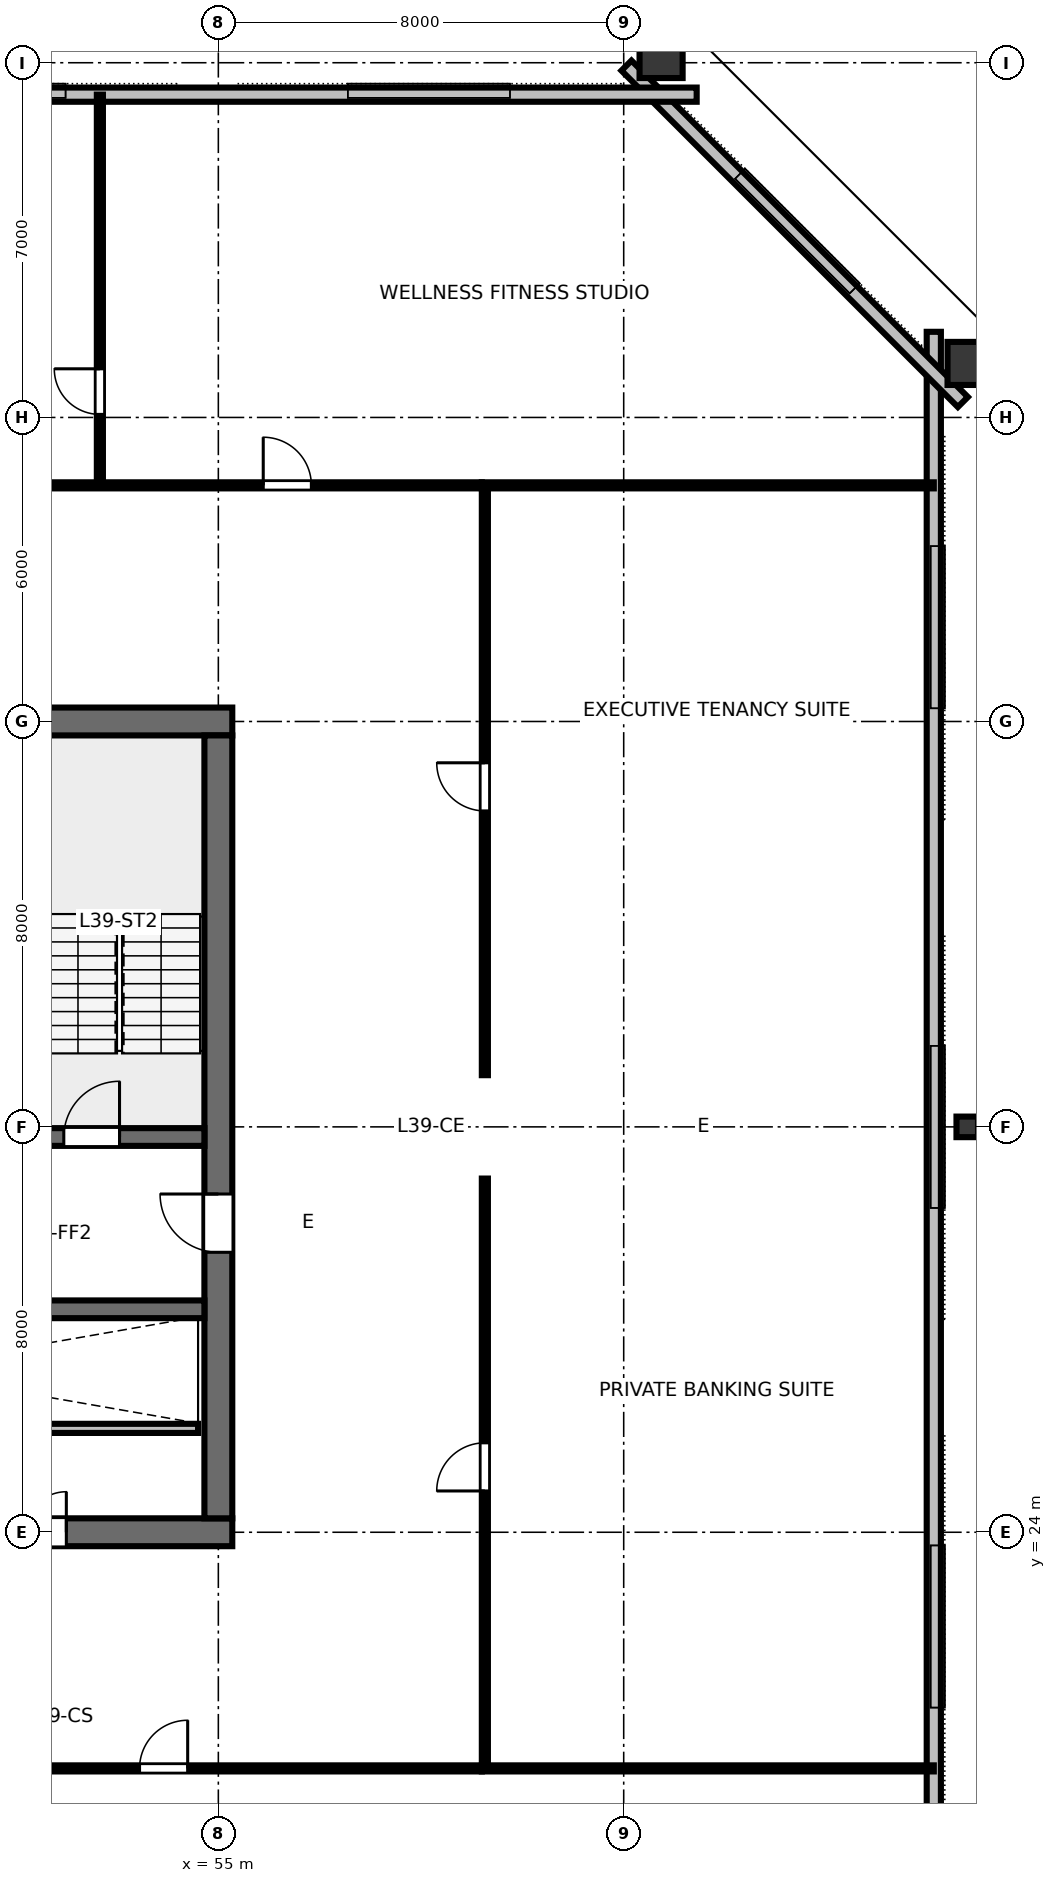
"""IFC4 building model, lengths in metres.
Left out: names, types, materials, properties, quantities, classifications, styles, units other than length and angle.
Written with IfcOpenShell. Run it as: python <this file> out.ifc"""

import sys

from ifc_helpers import new_model, si_unit, direction, frame, frame_2d, origin, origin_2d, place, context, subcontext, project, spatial, rectangle, hollow_rectangle, i_section, extrude, element, fill, save


model = new_model("IFC4")
c1 = context("Model", 3, precision=1e-05, world=origin(), true_north=direction((0.0, 1.0)))
c2 = subcontext(c1, "Body", "Model", "MODEL_VIEW")
j1 = project(units=[si_unit("LENGTHUNIT", "METRE"), si_unit("PLANEANGLEUNIT", "RADIAN")], contexts=[c1])
p1 = place(None, origin())
s1 = spatial("IfcSite", under=j1, at=p1, CompositionType="ELEMENT")
p2 = place(p1, origin())
s2 = spatial("IfcBuilding", under=s1, at=p2, CompositionType="ELEMENT")
p3 = place(p2, frame((0.0, 0.0, 149.2)))
s3 = spatial("IfcBuildingStorey", under=s2, at=p3, CompositionType="ELEMENT", Elevation=149.2)
p4 = place(p3, frame((36.725, 24.0, 0.0), z_axis=(0.0, 0.0, 1.0), x_axis=(1.0, 0.0, 0.0)))
e1 = element("IfcWall", 1, at=p4, inside=s3, PredefinedType="SHEAR", context=c2, shape_type="SweptSolid", body=[
    extrude(rectangle(XDim=18.55, YDim=0.55, at=frame_2d((9.275, 0.0))), origin(), (0.0, 0.0, 1.0), 3.36),
])
p5 = place(p4, frame((8.275, 0.0, 0.0)))
e2 = element("IfcOpeningElement", 2, at=p5, cuts=e1, PredefinedType="OPENING", context=c2, shape_type="SweptSolid", body=[
    extrude(rectangle(XDim=1.6, YDim=2.15, at=frame_2d((0.8, 1.075))), frame((0.0, 0.285, 0.0), z_axis=(0.0, -1.0, 0.0), x_axis=(1.0, 0.0, 0.0)), (0.0, 0.0, 1.0), 0.57),
])
p6 = place(p4, frame((13.675, 0.0, 0.0)))
e3 = element("IfcOpeningElement", 3, at=p6, cuts=e1, PredefinedType="OPENING", context=c2, shape_type="SweptSolid", body=[
    extrude(rectangle(XDim=1.6, YDim=2.15, at=frame_2d((0.8, 1.075))), frame((0.0, 0.285, 0.0), z_axis=(0.0, -1.0, 0.0), x_axis=(1.0, 0.0, 0.0)), (0.0, 0.0, 1.0), 0.57),
])
p7 = place(p3, frame((36.725, 40.0, 0.0), z_axis=(0.0, 0.0, 1.0), x_axis=(1.0, 0.0, 0.0)))
e4 = element("IfcWall", 4, at=p7, inside=s3, PredefinedType="SHEAR", context=c2, shape_type="SweptSolid", body=[
    extrude(rectangle(XDim=18.55, YDim=0.55, at=frame_2d((9.275, 0.0))), origin(), (0.0, 0.0, 1.0), 3.36),
])
p8 = place(p7, frame((8.775, 0.0, 0.0)))
e5 = element("IfcOpeningElement", 5, at=p8, cuts=e4, PredefinedType="OPENING", context=c2, shape_type="SweptSolid", body=[
    extrude(rectangle(XDim=1.0, YDim=2.15, at=frame_2d((0.5, 1.075))), frame((0.0, 0.285, 0.0), z_axis=(0.0, -1.0, 0.0), x_axis=(1.0, 0.0, 0.0)), (0.0, 0.0, 1.0), 0.57),
])
p9 = place(p3, frame((55.0, 24.275, 0.0), z_axis=(0.0, 0.0, 1.0), x_axis=(0.0, 1.0, 0.0)))
e6 = element("IfcWall", 6, at=p9, inside=s3, PredefinedType="SHEAR", context=c2, shape_type="SweptSolid", body=[
    extrude(rectangle(XDim=15.45, YDim=0.55, at=frame_2d((7.725, 0.0))), origin(), (0.0, 0.0, 1.0), 3.36),
])
p10 = place(p9, frame((5.25, 0.0, 0.0)))
e7 = element("IfcOpeningElement", 7, at=p10, cuts=e6, PredefinedType="OPENING", context=c2, shape_type="SweptSolid", body=[
    extrude(rectangle(XDim=1.15, YDim=2.15, at=frame_2d((0.575, 1.075))), frame((0.0, 0.285, 0.0), z_axis=(0.0, -1.0, 0.0), x_axis=(1.0, 0.0, 0.0)), (0.0, 0.0, 1.0), 0.57),
])
p11 = place(p3, frame((37.275, 31.8, 0.0), z_axis=(0.0, 0.0, 1.0), x_axis=(1.0, 0.0, 0.0)))
e8 = element("IfcWall", 8, at=p11, inside=s3, PredefinedType="SHEAR", context=c2, shape_type="SweptSolid", body=[
    extrude(rectangle(XDim=17.45, YDim=0.35, at=frame_2d((8.725, 0.0))), origin(), (0.0, 0.0, 1.0), 3.36),
])
p12 = place(p11, frame((0.775, 0.0, 0.0)))
e9 = element("IfcOpeningElement", 9, at=p12, cuts=e8, PredefinedType="OPENING", context=c2, shape_type="SweptSolid", body=[
    extrude(rectangle(XDim=1.1, YDim=2.15, at=frame_2d((0.55, 1.075))), frame((0.0, 0.185, 0.0), z_axis=(0.0, -1.0, 0.0), x_axis=(1.0, 0.0, 0.0)), (0.0, 0.0, 1.0), 0.37),
])
p13 = place(p11, frame((14.675, 0.0, 0.0)))
e10 = element("IfcOpeningElement", 10, at=p13, cuts=e8, PredefinedType="OPENING", context=c2, shape_type="SweptSolid", body=[
    extrude(rectangle(XDim=1.1, YDim=2.15, at=frame_2d((0.55, 1.075))), frame((0.0, 0.185, 0.0), z_axis=(0.0, -1.0, 0.0), x_axis=(1.0, 0.0, 0.0)), (0.0, 0.0, 1.0), 0.37),
])
p14 = place(p3, frame((37.275, 28.4, 0.0), z_axis=(0.0, 0.0, 1.0), x_axis=(1.0, 0.0, 0.0)))
e11 = element("IfcWall", 11, at=p14, inside=s3, PredefinedType="SHEAR", context=c2, shape_type="SweptSolid", body=[
    extrude(rectangle(XDim=17.45, YDim=0.35, at=frame_2d((8.725, 0.0))), origin(), (0.0, 0.0, 1.0), 3.36),
])
p15 = place(p3, frame((69.78, 32.0, 0.0), z_axis=(0.0, 0.0, 1.0), x_axis=(0.0, 1.0, 0.0)))
e12 = element("IfcColumn", 12, at=p15, inside=s3, PredefinedType="COLUMN", context=c2, shape_type="SweptSolid", body=[
    extrude(i_section(OverallWidth=0.406, OverallDepth=0.425, WebThickness=0.033, FlangeThickness=0.052, FilletRadius=0.025, at=origin_2d()), origin(), (0.0, 0.0, 1.0), 3.358),
])
for number, where, z_axis, x_axis in (
    (13, (69.891, 47.066, 0.0), (0.0, 0.0, 1.0), (0.0, 1.0, 0.0)),
    (14, (63.738, 53.198, 0.0), (0.0, 0.0, 1.0), (1.0, 0.0, 0.0)),
):
    element("IfcColumn", number, at=place(p3, frame(where, z_axis=z_axis, x_axis=x_axis)), inside=s3, PredefinedType="COLUMN", context=c2, shape_type="SweptSolid", body=[
        extrude(hollow_rectangle(XDim=0.85, YDim=1.0, WallThickness=0.05, at=origin_2d()), origin(), (0.0, 0.0, 1.0), 3.358),
    ])
p16 = place(p3, frame((69.12, 16.31, 0.0), z_axis=(0.0, 0.0, 1.0), x_axis=(0.0, 1.0, 0.0)))
e15 = element("IfcWall", 15, at=p16, inside=s3, PredefinedType="STANDARD", context=c2, shape_type="SweptSolid", body=[
    extrude(rectangle(XDim=31.38, YDim=0.28, at=frame_2d((15.69, 0.0))), origin(), (0.0, 0.0, 1.0), 3.36),
])
p17 = place(p3, frame((69.694, 46.304, 0.0), z_axis=(0.0, 0.0, 1.0), x_axis=(-0.707106781187, 0.707106781187, 0.0)))
e16 = element("IfcWall", 16, at=p17, inside=s3, PredefinedType="STANDARD", context=c2, shape_type="SweptSolid", body=[
    extrude(rectangle(XDim=9.39, YDim=0.28, at=frame_2d((4.695, 0.0))), origin(), (0.0, 0.0, 1.0), 3.36),
])
p18 = place(p3, frame((64.44, 52.37, 0.0), z_axis=(0.0, 0.0, 1.0), x_axis=(-1.0, 0.0, 0.0)))
e17 = element("IfcWall", 17, at=p18, inside=s3, PredefinedType="STANDARD", context=c2, shape_type="SweptSolid", body=[
    extrude(rectangle(XDim=36.88, YDim=0.28, at=frame_2d((18.44, 0.0))), origin(), (0.0, 0.0, 1.0), 3.36),
])
p19 = place(p3, frame((42.55, 26.05, 0.0), z_axis=(0.0, 0.0, 1.0), x_axis=(1.0, 0.0, 0.0)))
e18 = element("IfcWall", 18, at=p19, inside=s3, PredefinedType="PARTITIONING", context=c2, shape_type="SweptSolid", body=[
    extrude(rectangle(XDim=12.05, YDim=0.18, at=frame_2d((6.025, 0.0))), origin(), (0.0, 0.0, 1.0), 3.36),
])
p20 = place(p19, frame((1.1, 0.0, 0.0)))
e19 = element("IfcOpeningElement", 19, at=p20, cuts=e18, PredefinedType="OPENING", context=c2, shape_type="SweptSolid", body=[
    extrude(rectangle(XDim=1.05, YDim=2.15, at=frame_2d((0.525, 1.075))), frame((0.0, 0.1, 0.0), z_axis=(0.0, -1.0, 0.0), x_axis=(1.0, 0.0, 0.0)), (0.0, 0.0, 1.0), 0.2),
])
p21 = place(p19, frame((3.0, 0.0, 0.0)))
e20 = element("IfcOpeningElement", 20, at=p21, cuts=e18, PredefinedType="OPENING", context=c2, shape_type="SweptSolid", body=[
    extrude(rectangle(XDim=1.05, YDim=2.15, at=frame_2d((0.525, 1.075))), frame((0.0, 0.1, 0.0), z_axis=(0.0, -1.0, 0.0), x_axis=(1.0, 0.0, 0.0)), (0.0, 0.0, 1.0), 0.2),
])
p22 = place(p3, frame((31.8, 19.34, 0.0), z_axis=(0.0, 0.0, 1.0), x_axis=(1.0, 0.0, 0.0)))
e21 = element("IfcWall", 21, at=p22, inside=s3, PredefinedType="PARTITIONING", context=c2, shape_type="SweptSolid", body=[
    extrude(rectangle(XDim=28.4, YDim=0.12, at=frame_2d((14.2, 0.0))), origin(), (0.0, 0.0, 1.0), 2.64),
])
p23 = place(p22, frame((4.789, 0.0, 0.0)))
e22 = element("IfcOpeningElement", 22, at=p23, cuts=e21, PredefinedType="OPENING", context=c2, shape_type="SweptSolid", body=[
    extrude(rectangle(XDim=0.95, YDim=2.15, at=frame_2d((0.475, 1.075))), frame((0.0, 0.07, 0.0), z_axis=(0.0, -1.0, 0.0), x_axis=(1.0, 0.0, 0.0)), (0.0, 0.0, 1.0), 0.14),
])
p24 = place(p22, frame((12.708, 0.0, 0.0)))
e23 = element("IfcOpeningElement", 23, at=p24, cuts=e21, PredefinedType="OPENING", context=c2, shape_type="SweptSolid", body=[
    extrude(rectangle(XDim=0.95, YDim=2.15, at=frame_2d((0.475, 1.075))), frame((0.0, 0.07, 0.0), z_axis=(0.0, -1.0, 0.0), x_axis=(1.0, 0.0, 0.0)), (0.0, 0.0, 1.0), 0.14),
])
p25 = place(p22, frame((21.645, 0.0, 0.0)))
e24 = element("IfcOpeningElement", 24, at=p25, cuts=e21, PredefinedType="OPENING", context=c2, shape_type="SweptSolid", body=[
    extrude(rectangle(XDim=0.95, YDim=2.15, at=frame_2d((0.475, 1.075))), frame((0.0, 0.07, 0.0), z_axis=(0.0, -1.0, 0.0), x_axis=(1.0, 0.0, 0.0)), (0.0, 0.0, 1.0), 0.14),
])
p26 = place(p3, frame((52.662, 44.66, 0.0), z_axis=(0.0, 0.0, 1.0), x_axis=(0.0, 1.0, 0.0)))
e25 = element("IfcWall", 25, at=p26, inside=s3, PredefinedType="PARTITIONING", context=c2, shape_type="SweptSolid", body=[
    extrude(rectangle(XDim=7.71, YDim=0.12, at=frame_2d((3.855, 0.0))), origin(), (0.0, 0.0, 1.0), 2.64),
])
p27 = place(p26, frame((1.4, 0.0, 0.0)))
e26 = element("IfcOpeningElement", 26, at=p27, cuts=e25, PredefinedType="OPENING", context=c2, shape_type="SweptSolid", body=[
    extrude(rectangle(XDim=0.9, YDim=2.15, at=frame_2d((0.45, 1.075))), frame((0.0, 0.07, 0.0), z_axis=(0.0, -1.0, 0.0), x_axis=(1.0, 0.0, 0.0)), (0.0, 0.0, 1.0), 0.14),
])
p28 = place(p3, frame((31.8, 44.66, 0.0), z_axis=(0.0, 0.0, 1.0), x_axis=(1.0, 0.0, 0.0)))
e27 = element("IfcWall", 27, at=p28, inside=s3, PredefinedType="PARTITIONING", context=c2, shape_type="SweptSolid", body=[
    extrude(rectangle(XDim=28.4, YDim=0.12, at=frame_2d((14.2, 0.0))), origin(), (0.0, 0.0, 1.0), 2.64),
])
p29 = place(p28, frame((4.036, 0.0, 0.0)))
e28 = element("IfcOpeningElement", 28, at=p29, cuts=e27, PredefinedType="OPENING", context=c2, shape_type="SweptSolid", body=[
    extrude(rectangle(XDim=0.95, YDim=2.15, at=frame_2d((0.475, 1.075))), frame((0.0, 0.07, 0.0), z_axis=(0.0, -1.0, 0.0), x_axis=(1.0, 0.0, 0.0)), (0.0, 0.0, 1.0), 0.14),
])
p30 = place(p28, frame((12.256, 0.0, 0.0)))
e29 = element("IfcOpeningElement", 29, at=p30, cuts=e27, PredefinedType="OPENING", context=c2, shape_type="SweptSolid", body=[
    extrude(rectangle(XDim=0.95, YDim=2.15, at=frame_2d((0.475, 1.075))), frame((0.0, 0.07, 0.0), z_axis=(0.0, -1.0, 0.0), x_axis=(1.0, 0.0, 0.0)), (0.0, 0.0, 1.0), 0.14),
])
p31 = place(p28, frame((18.246, 0.0, 0.0)))
e30 = element("IfcOpeningElement", 30, at=p31, cuts=e27, PredefinedType="OPENING", context=c2, shape_type="SweptSolid", body=[
    extrude(rectangle(XDim=0.95, YDim=2.15, at=frame_2d((0.475, 1.075))), frame((0.0, 0.07, 0.0), z_axis=(0.0, -1.0, 0.0), x_axis=(1.0, 0.0, 0.0)), (0.0, 0.0, 1.0), 0.14),
])
p32 = place(p28, frame((24.086, 0.0, 0.0)))
e31 = element("IfcOpeningElement", 31, at=p32, cuts=e27, PredefinedType="OPENING", context=c2, shape_type="SweptSolid", body=[
    extrude(rectangle(XDim=0.95, YDim=2.15, at=frame_2d((0.475, 1.075))), frame((0.0, 0.07, 0.0), z_axis=(0.0, -1.0, 0.0), x_axis=(1.0, 0.0, 0.0)), (0.0, 0.0, 1.0), 0.14),
])
p33 = place(p3, frame((60.26, 19.4, 0.0), z_axis=(0.0, 0.0, 1.0), x_axis=(0.0, 1.0, 0.0)))
e32 = element("IfcWall", 32, at=p33, inside=s3, PredefinedType="PARTITIONING", context=c2, shape_type="SweptSolid", body=[
    extrude(rectangle(XDim=11.58, YDim=0.12, at=frame_2d((5.79, 0.0))), origin(), (0.0, 0.0, 1.0), 2.64),
])
p34 = place(p33, frame((5.415, 0.0, 0.0)))
e33 = element("IfcOpeningElement", 33, at=p34, cuts=e32, PredefinedType="OPENING", context=c2, shape_type="SweptSolid", body=[
    extrude(rectangle(XDim=0.95, YDim=2.15, at=frame_2d((0.475, 1.075))), frame((0.0, 0.07, 0.0), z_axis=(0.0, -1.0, 0.0), x_axis=(1.0, 0.0, 0.0)), (0.0, 0.0, 1.0), 0.14),
])
p35 = place(p3, frame((60.26, 33.02, 0.0), z_axis=(0.0, 0.0, 1.0), x_axis=(0.0, 1.0, 0.0)))
e34 = element("IfcWall", 34, at=p35, inside=s3, PredefinedType="PARTITIONING", context=c2, shape_type="SweptSolid", body=[
    extrude(rectangle(XDim=11.58, YDim=0.12, at=frame_2d((5.79, 0.0))), origin(), (0.0, 0.0, 1.0), 2.64),
])
p36 = place(p35, frame((5.215, 0.0, 0.0)))
e35 = element("IfcOpeningElement", 35, at=p36, cuts=e34, PredefinedType="OPENING", context=c2, shape_type="SweptSolid", body=[
    extrude(rectangle(XDim=0.95, YDim=2.15, at=frame_2d((0.475, 1.075))), frame((0.0, 0.07, 0.0), z_axis=(0.0, -1.0, 0.0), x_axis=(1.0, 0.0, 0.0)), (0.0, 0.0, 1.0), 0.14),
])
for number, where, z_axis, x_axis in (
    (36, (60.2, 19.34, 0.0), (0.0, 0.0, 1.0), (1.0, 0.0, 0.0)),
    (37, (60.2, 44.66, 0.0), (0.0, 0.0, 1.0), (1.0, 0.0, 0.0)),
):
    element("IfcWall", number, at=place(p3, frame(where, z_axis=z_axis, x_axis=x_axis)), inside=s3, PredefinedType="PARTITIONING", context=c2, shape_type="SweptSolid", body=[
        extrude(rectangle(XDim=8.92, YDim=0.12, at=frame_2d((4.46, 0.0))), origin(), (0.0, 0.0, 1.0), 2.64),
    ])
p37 = place(p13, origin())
e38 = element("IfcDoor", 38, at=p37, inside=s3, OperationType="SINGLE_SWING_RIGHT", PredefinedType="DOOR", context=c2, shape_type="SweptSolid", body=[
    extrude(rectangle(XDim=1.1, YDim=2.15, at=frame_2d((0.55, 1.075))), frame((0.0, 0.025, 0.0), z_axis=(0.0, -1.0, 0.0), x_axis=(1.0, 0.0, 0.0)), (0.0, 0.0, 1.0), 0.05),
])
fill(e10, e38)
p38 = place(p10, origin())
e39 = element("IfcDoor", 39, at=p38, inside=s3, OperationType="SINGLE_SWING_RIGHT", PredefinedType="DOOR", context=c2, shape_type="SweptSolid", body=[
    extrude(rectangle(XDim=1.15, YDim=2.15, at=frame_2d((0.575, 1.075))), frame((0.0, 0.025, 0.0), z_axis=(0.0, -1.0, 0.0), x_axis=(1.0, 0.0, 0.0)), (0.0, 0.0, 1.0), 0.05),
])
fill(e7, e39)
p39 = place(p6, origin())
e40 = element("IfcDoor", 40, at=p39, inside=s3, OperationType="DOUBLE_DOOR_SINGLE_SWING", PredefinedType="DOOR", context=c2, shape_type="SweptSolid", body=[
    extrude(rectangle(XDim=1.6, YDim=2.15, at=frame_2d((0.8, 1.075))), frame((0.0, 0.025, 0.0), z_axis=(0.0, -1.0, 0.0), x_axis=(1.0, 0.0, 0.0)), (0.0, 0.0, 1.0), 0.05),
])
fill(e3, e40)
p40 = place(p25, origin())
e41 = element("IfcDoor", 41, at=p40, inside=s3, OperationType="SINGLE_SWING_RIGHT", PredefinedType="DOOR", context=c2, shape_type="SweptSolid", body=[
    extrude(rectangle(XDim=0.95, YDim=2.15, at=frame_2d((0.475, 1.075))), frame((0.0, 0.025, 0.0), z_axis=(0.0, -1.0, 0.0), x_axis=(1.0, 0.0, 0.0)), (0.0, 0.0, 1.0), 0.05),
])
fill(e24, e41)
p41 = place(p27, origin())
e42 = element("IfcDoor", 42, at=p41, inside=s3, OperationType="SINGLE_SWING_RIGHT", PredefinedType="DOOR", context=c2, shape_type="SweptSolid", body=[
    extrude(rectangle(XDim=0.9, YDim=2.15, at=frame_2d((0.45, 1.075))), frame((0.0, 0.025, 0.0), z_axis=(0.0, -1.0, 0.0), x_axis=(1.0, 0.0, 0.0)), (0.0, 0.0, 1.0), 0.05),
])
fill(e26, e42)
p42 = place(p32, origin())
e43 = element("IfcDoor", 43, at=p42, inside=s3, OperationType="SINGLE_SWING_LEFT", PredefinedType="DOOR", context=c2, shape_type="SweptSolid", body=[
    extrude(rectangle(XDim=0.95, YDim=2.15, at=frame_2d((0.475, 1.075))), frame((0.0, 0.025, 0.0), z_axis=(0.0, -1.0, 0.0), x_axis=(1.0, 0.0, 0.0)), (0.0, 0.0, 1.0), 0.05),
])
fill(e31, e43)
p43 = place(p34, origin())
e44 = element("IfcDoor", 44, at=p43, inside=s3, OperationType="SINGLE_SWING_LEFT", PredefinedType="DOOR", context=c2, shape_type="SweptSolid", body=[
    extrude(rectangle(XDim=0.95, YDim=2.15, at=frame_2d((0.475, 1.075))), frame((0.0, 0.025, 0.0), z_axis=(0.0, -1.0, 0.0), x_axis=(1.0, 0.0, 0.0)), (0.0, 0.0, 1.0), 0.05),
])
fill(e33, e44)
p44 = place(p36, origin())
e45 = element("IfcDoor", 45, at=p44, inside=s3, OperationType="SINGLE_SWING_RIGHT", PredefinedType="DOOR", context=c2, shape_type="SweptSolid", body=[
    extrude(rectangle(XDim=0.95, YDim=2.15, at=frame_2d((0.475, 1.075))), frame((0.0, 0.025, 0.0), z_axis=(0.0, -1.0, 0.0), x_axis=(1.0, 0.0, 0.0)), (0.0, 0.0, 1.0), 0.05),
])
fill(e35, e45)
save(model, sys.argv[1])
